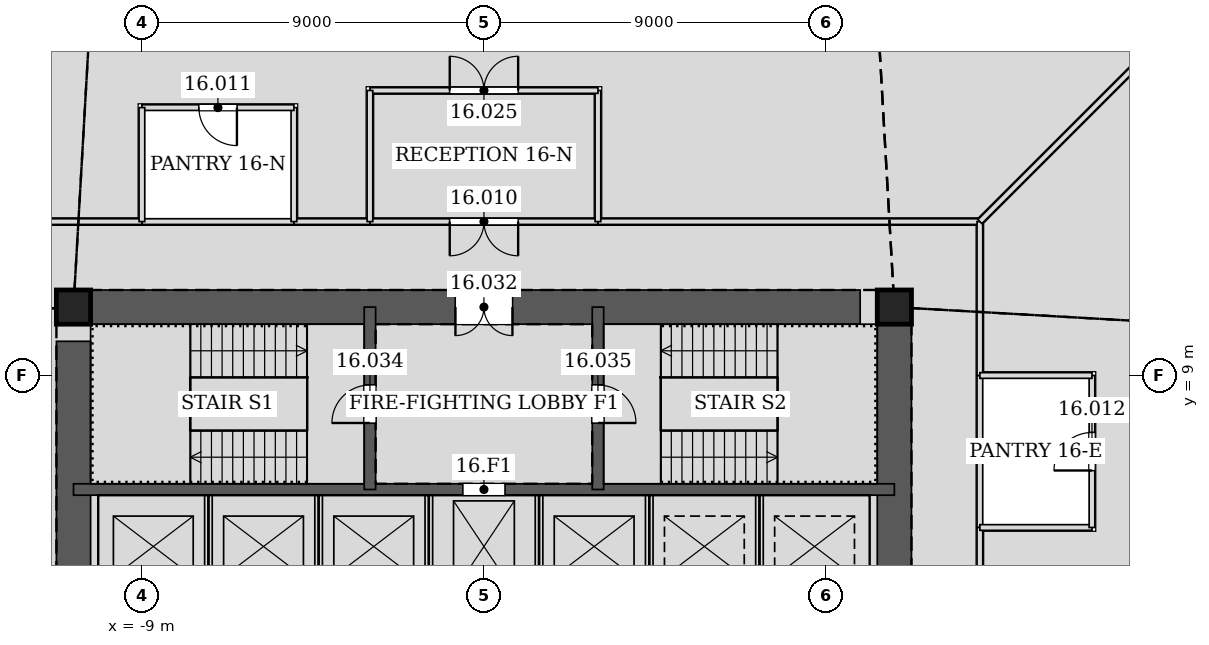
"""IFC4 building model, lengths in metres.
Left out: names, types, materials, properties, quantities, classifications, styles, units other than length and angle.
Written with IfcOpenShell. Run it as: python <this file> out.ifc"""

import sys

from ifc_helpers import new_model, si_unit, direction, frame, frame_2d, origin, origin_2d, place, context, subcontext, project, spatial, rectangle, hollow_rectangle, extrude, element, fill, save


model = new_model("IFC4")
c1 = context("Model", 3, precision=1e-05, world=origin(), true_north=direction((0.0, 1.0)))
c2 = subcontext(c1, "Body", "Model", "MODEL_VIEW")
j1 = project(units=[si_unit("LENGTHUNIT", "METRE"), si_unit("PLANEANGLEUNIT", "RADIAN")], contexts=[c1])
p1 = place(None, origin())
s1 = spatial("IfcSite", under=j1, at=p1, CompositionType="ELEMENT")
p2 = place(p1, origin())
s2 = spatial("IfcBuilding", under=s1, at=p2, CompositionType="ELEMENT")
p3 = place(p2, frame((0.0, 0.0, 75.0)))
s3 = spatial("IfcBuildingStorey", under=s2, at=p3, CompositionType="ELEMENT", Elevation=75.0)
for number, where, z_axis, x_axis in (
    (1, (10.8, 10.8, 0.0), (0.0, 0.0, 1.0), (1.0, 0.0, 0.0)),
    (2, (-10.8, 10.8, 0.0), (0.0, 0.0, 1.0), (1.0, 0.0, 0.0)),
):
    element("IfcColumn", number, at=place(p3, frame(where, z_axis=z_axis, x_axis=x_axis)), inside=s3, PredefinedType="COLUMN", context=c2, shape_type="SweptSolid", body=[
        extrude(hollow_rectangle(XDim=0.9, YDim=0.9, WallThickness=0.06, at=origin_2d()), origin(), (0.0, 0.0, 1.0), 4.2),
    ])
p4 = place(p3, frame((10.8, -10.8, 0.0), z_axis=(0.0, 0.0, 1.0), x_axis=(0.0, 1.0, 0.0)))
e3 = element("IfcWall", 3, at=p4, inside=s3, PredefinedType="SOLIDWALL", context=c2, shape_type="SweptSolid", body=[
    extrude(rectangle(XDim=21.6, YDim=0.9, at=frame_2d((10.8, 0.0))), origin(), (0.0, 0.0, 1.0), 4.2),
])
p5 = place(p4, frame((11.7, 0.0, 0.0)))
e4 = element("IfcOpeningElement", 4, at=p5, cuts=e3, PredefinedType="OPENING", context=c2, shape_type="SweptSolid", body=[
    extrude(rectangle(XDim=1.2, YDim=2.1, at=frame_2d((0.6, 1.05))), frame((0.0, 0.46, 0.0), z_axis=(0.0, -1.0, 0.0), x_axis=(1.0, 0.0, 0.0)), (0.0, 0.0, 1.0), 0.92),
])
p6 = place(p4, frame((8.7, 0.0, 0.0)))
e5 = element("IfcOpeningElement", 5, at=p6, cuts=e3, PredefinedType="OPENING", context=c2, shape_type="SweptSolid", body=[
    extrude(rectangle(XDim=1.2, YDim=2.1, at=frame_2d((0.6, 1.05))), frame((0.0, 0.46, 0.0), z_axis=(0.0, -1.0, 0.0), x_axis=(1.0, 0.0, 0.0)), (0.0, 0.0, 1.0), 0.92),
])
p7 = place(p3, frame((10.8, 10.8, 0.0), z_axis=(0.0, 0.0, 1.0), x_axis=(-1.0, 0.0, 0.0)))
e6 = element("IfcWall", 6, at=p7, inside=s3, PredefinedType="SOLIDWALL", context=c2, shape_type="SweptSolid", body=[
    extrude(rectangle(XDim=21.6, YDim=0.9, at=frame_2d((10.8, 0.0))), origin(), (0.0, 0.0, 1.0), 4.2),
])
p8 = place(p7, frame((10.05, 0.0, 0.0)))
e7 = element("IfcOpeningElement", 7, at=p8, cuts=e6, PredefinedType="OPENING", context=c2, shape_type="SweptSolid", body=[
    extrude(rectangle(XDim=1.5, YDim=2.1, at=frame_2d((0.75, 1.05))), frame((0.0, 0.46, 0.0), z_axis=(0.0, -1.0, 0.0), x_axis=(1.0, 0.0, 0.0)), (0.0, 0.0, 1.0), 0.92),
])
p9 = place(p3, frame((-10.8, 10.8, 0.0), z_axis=(0.0, 0.0, 1.0), x_axis=(0.0, -1.0, 0.0)))
e8 = element("IfcWall", 8, at=p9, inside=s3, PredefinedType="SOLIDWALL", context=c2, shape_type="SweptSolid", body=[
    extrude(rectangle(XDim=21.6, YDim=0.9, at=frame_2d((10.8, 0.0))), origin(), (0.0, 0.0, 1.0), 4.2),
])
p10 = place(p9, frame((8.7, 0.0, 0.0)))
e9 = element("IfcOpeningElement", 9, at=p10, cuts=e8, PredefinedType="OPENING", context=c2, shape_type="SweptSolid", body=[
    extrude(rectangle(XDim=1.2, YDim=2.1, at=frame_2d((0.6, 1.05))), frame((0.0, 0.46, 0.0), z_axis=(0.0, -1.0, 0.0), x_axis=(1.0, 0.0, 0.0)), (0.0, 0.0, 1.0), 0.92),
])
p11 = place(p9, frame((11.7, 0.0, 0.0)))
e10 = element("IfcOpeningElement", 10, at=p11, cuts=e8, PredefinedType="OPENING", context=c2, shape_type="SweptSolid", body=[
    extrude(rectangle(XDim=1.2, YDim=2.1, at=frame_2d((0.6, 1.05))), frame((0.0, 0.46, 0.0), z_axis=(0.0, -1.0, 0.0), x_axis=(1.0, 0.0, 0.0)), (0.0, 0.0, 1.0), 0.92),
])
p12 = place(p3, frame((-10.8, 6.0, 0.0), z_axis=(0.0, 0.0, 1.0), x_axis=(1.0, 0.0, 0.0)))
e11 = element("IfcWall", 11, at=p12, inside=s3, PredefinedType="SOLIDWALL", context=c2, shape_type="SweptSolid", body=[
    extrude(rectangle(XDim=21.6, YDim=0.3, at=frame_2d((10.8, 0.0))), origin(), (0.0, 0.0, 1.0), 4.2),
])
p13 = place(p12, frame((10.25, 0.0, 0.0)))
e12 = element("IfcOpeningElement", 12, at=p13, cuts=e11, PredefinedType="OPENING", context=c2, shape_type="SweptSolid", body=[
    extrude(rectangle(XDim=1.1, YDim=2.1, at=frame_2d((0.55, 1.05))), frame((0.0, 0.16, 0.0), z_axis=(0.0, -1.0, 0.0), x_axis=(1.0, 0.0, 0.0)), (0.0, 0.0, 1.0), 0.32),
])
p14 = place(p3, frame((-3.0, 6.0, 0.0), z_axis=(0.0, 0.0, 1.0), x_axis=(0.0, 1.0, 0.0)))
e13 = element("IfcWall", 13, at=p14, inside=s3, PredefinedType="SOLIDWALL", context=c2, shape_type="SweptSolid", body=[
    extrude(rectangle(XDim=4.8, YDim=0.3, at=frame_2d((2.4, 0.0))), origin(), (0.0, 0.0, 1.0), 4.2),
])
p15 = place(p14, frame((1.75, 0.0, 0.0)))
e14 = element("IfcOpeningElement", 14, at=p15, cuts=e13, PredefinedType="OPENING", context=c2, shape_type="SweptSolid", body=[
    extrude(rectangle(XDim=1.0, YDim=2.1, at=frame_2d((0.5, 1.05))), frame((0.0, 0.16, 0.0), z_axis=(0.0, -1.0, 0.0), x_axis=(1.0, 0.0, 0.0)), (0.0, 0.0, 1.0), 0.32),
])
p16 = place(p3, frame((3.0, 6.0, 0.0), z_axis=(0.0, 0.0, 1.0), x_axis=(0.0, 1.0, 0.0)))
e15 = element("IfcWall", 15, at=p16, inside=s3, PredefinedType="SOLIDWALL", context=c2, shape_type="SweptSolid", body=[
    extrude(rectangle(XDim=4.8, YDim=0.3, at=frame_2d((2.4, 0.0))), origin(), (0.0, 0.0, 1.0), 4.2),
])
p17 = place(p16, frame((1.75, 0.0, 0.0)))
e16 = element("IfcOpeningElement", 16, at=p17, cuts=e15, PredefinedType="OPENING", context=c2, shape_type="SweptSolid", body=[
    extrude(rectangle(XDim=1.0, YDim=2.1, at=frame_2d((0.5, 1.05))), frame((0.0, 0.16, 0.0), z_axis=(0.0, -1.0, 0.0), x_axis=(1.0, 0.0, 0.0)), (0.0, 0.0, 1.0), 0.32),
])
p18 = place(p3, frame((3.001, 13.05, 0.0), z_axis=(0.0, 0.0, 1.0), x_axis=(-1.0, 0.0, 0.0)))
e17 = element("IfcWall", 17, at=p18, inside=s3, PredefinedType="PARTITIONING", context=c2, shape_type="SweptSolid", body=[
    extrude(rectangle(XDim=6.002, YDim=0.15, at=frame_2d((3.001, 0.0))), origin(), (0.0, 0.0, 1.0), 3.065),
])
p19 = place(p18, frame((2.101, 0.0, 0.0)))
e18 = element("IfcOpeningElement", 18, at=p19, cuts=e17, PredefinedType="OPENING", context=c2, shape_type="SweptSolid", body=[
    extrude(rectangle(XDim=1.8, YDim=2.4, at=frame_2d((0.9, 1.2))), frame((0.0, 0.085, 0.0), z_axis=(0.0, -1.0, 0.0), x_axis=(1.0, 0.0, 0.0)), (0.0, 0.0, 1.0), 0.17),
])
for number, where, z_axis, x_axis in (
    (19, (-4.999, 13.05, 0.0), (0.0, 0.0, 1.0), (-1.0, 0.0, 0.0)),
    (20, (13.05, 4.999, 0.0), (0.0, 0.0, 1.0), (0.0, 1.0, 0.0)),
):
    element("IfcWall", number, at=place(p3, frame(where, z_axis=z_axis, x_axis=x_axis)), inside=s3, PredefinedType="PARTITIONING", context=c2, shape_type="SweptSolid", body=[
        extrude(rectangle(XDim=4.002, YDim=0.15, at=frame_2d((2.001, 0.0))), origin(), (0.0, 0.0, 1.0), 4.035),
    ])
p20 = place(p3, frame((-8.999, 13.05, 0.0), z_axis=(0.0, 0.0, 1.0), x_axis=(-1.0, 0.0, 0.0)))
e21 = element("IfcWall", 21, at=p20, inside=s3, PredefinedType="PARTITIONING", context=c2, shape_type="SweptSolid", body=[
    extrude(rectangle(XDim=4.051, YDim=0.15, at=frame_2d((2.025, 0.0))), origin(), (0.0, 0.0, 1.0), 3.014),
])
p21 = place(p3, frame((-2.999, 13.05, 0.0), z_axis=(0.0, 0.0, 1.0), x_axis=(-1.0, 0.0, 0.0)))
e22 = element("IfcWall", 22, at=p21, inside=s3, PredefinedType="PARTITIONING", context=c2, shape_type="SweptSolid", body=[
    extrude(rectangle(XDim=2.002, YDim=0.15, at=frame_2d((1.001, 0.0))), origin(), (0.0, 0.0, 1.0), 4.035),
])
p22 = place(p3, frame((13.05, 13.05, 0.0), z_axis=(0.0, 0.0, 1.0), x_axis=(-1.0, 0.0, 0.0)))
e23 = element("IfcWall", 23, at=p22, inside=s3, PredefinedType="PARTITIONING", context=c2, shape_type="SweptSolid", body=[
    extrude(rectangle(XDim=10.051, YDim=0.15, at=frame_2d((5.025, 0.0))), origin(), (0.0, 0.0, 1.0), 3.014),
])
p23 = place(p3, frame((13.05, 8.999, 0.0), z_axis=(0.0, 0.0, 1.0), x_axis=(0.0, 1.0, 0.0)))
e24 = element("IfcWall", 24, at=p23, inside=s3, PredefinedType="PARTITIONING", context=c2, shape_type="SweptSolid", body=[
    extrude(rectangle(XDim=4.051, YDim=0.15, at=frame_2d((2.025, 0.0))), origin(), (0.0, 0.0, 1.0), 3.014),
])
p24 = place(p3, frame((13.05, -10.05, 0.0), z_axis=(0.0, 0.0, 1.0), x_axis=(0.0, 1.0, 0.0)))
e25 = element("IfcWall", 25, at=p24, inside=s3, PredefinedType="PARTITIONING", context=c2, shape_type="SweptSolid", body=[
    extrude(rectangle(XDim=15.051, YDim=0.15, at=frame_2d((7.525, 0.0))), origin(), (0.0, 0.0, 1.0), 3.065),
])
p25 = place(p24, frame((6.625, 0.0, 0.0)))
e26 = element("IfcOpeningElement", 26, at=p25, cuts=e25, PredefinedType="OPENING", context=c2, shape_type="SweptSolid", body=[
    extrude(rectangle(XDim=1.8, YDim=2.4, at=frame_2d((0.9, 1.2))), frame((0.0, 0.085, 0.0), z_axis=(0.0, -1.0, 0.0), x_axis=(1.0, 0.0, 0.0)), (0.0, 0.0, 1.0), 0.17),
])
p26 = place(p3, frame((3.0, 13.05, 0.0), z_axis=(0.0, 0.0, 1.0), x_axis=(0.0, 1.0, 0.0)))
e27 = element("IfcWall", 27, at=p26, inside=s3, PredefinedType="PARTITIONING", context=c2, shape_type="SweptSolid", body=[
    extrude(rectangle(XDim=3.45, YDim=0.15, at=frame_2d((1.725, 0.0))), origin(), (0.0, 0.0, 1.0), 3.492),
])
p27 = place(p3, frame((3.0, 16.5, 0.0), z_axis=(0.0, 0.0, 1.0), x_axis=(-1.0, 0.0, 0.0)))
e28 = element("IfcWall", 28, at=p27, inside=s3, PredefinedType="PARTITIONING", context=c2, shape_type="SweptSolid", body=[
    extrude(rectangle(XDim=6.0, YDim=0.15, at=frame_2d((3.0, 0.0))), origin(), (0.0, 0.0, 1.0), 3.065),
])
p28 = place(p27, frame((2.1, 0.0, 0.0)))
e29 = element("IfcOpeningElement", 29, at=p28, cuts=e28, PredefinedType="OPENING", context=c2, shape_type="SweptSolid", body=[
    extrude(rectangle(XDim=1.8, YDim=2.4, at=frame_2d((0.9, 1.2))), frame((0.0, 0.085, 0.0), z_axis=(0.0, -1.0, 0.0), x_axis=(1.0, 0.0, 0.0)), (0.0, 0.0, 1.0), 0.17),
])
p29 = place(p3, frame((-3.0, 16.5, 0.0), z_axis=(0.0, 0.0, 1.0), x_axis=(0.0, -1.0, 0.0)))
e30 = element("IfcWall", 30, at=p29, inside=s3, PredefinedType="PARTITIONING", context=c2, shape_type="SweptSolid", body=[
    extrude(rectangle(XDim=3.45, YDim=0.15, at=frame_2d((1.725, 0.0))), origin(), (0.0, 0.0, 1.0), 3.492),
])
p30 = place(p3, frame((-5.0, 13.05, 0.0), z_axis=(0.0, 0.0, 1.0), x_axis=(0.0, 1.0, 0.0)))
e31 = element("IfcWall", 31, at=p30, inside=s3, PredefinedType="PARTITIONING", context=c2, shape_type="SweptSolid", body=[
    extrude(rectangle(XDim=3.0, YDim=0.15, at=frame_2d((1.5, 0.0))), origin(), (0.0, 0.0, 1.0), 3.492),
])
p31 = place(p3, frame((-5.0, 16.05, 0.0), z_axis=(0.0, 0.0, 1.0), x_axis=(-1.0, 0.0, 0.0)))
e32 = element("IfcWall", 32, at=p31, inside=s3, PredefinedType="PARTITIONING", context=c2, shape_type="SweptSolid", body=[
    extrude(rectangle(XDim=4.0, YDim=0.15, at=frame_2d((2.0, 0.0))), origin(), (0.0, 0.0, 1.0), 4.035),
])
p32 = place(p31, frame((1.5, 0.0, 0.0)))
e33 = element("IfcOpeningElement", 33, at=p32, cuts=e32, PredefinedType="OPENING", context=c2, shape_type="SweptSolid", body=[
    extrude(rectangle(XDim=1.0, YDim=2.1, at=frame_2d((0.5, 1.05))), frame((0.0, 0.085, 0.0), z_axis=(0.0, -1.0, 0.0), x_axis=(1.0, 0.0, 0.0)), (0.0, 0.0, 1.0), 0.17),
])
p33 = place(p3, frame((-9.0, 16.05, 0.0), z_axis=(0.0, 0.0, 1.0), x_axis=(0.0, -1.0, 0.0)))
e34 = element("IfcWall", 34, at=p33, inside=s3, PredefinedType="PARTITIONING", context=c2, shape_type="SweptSolid", body=[
    extrude(rectangle(XDim=3.0, YDim=0.15, at=frame_2d((1.5, 0.0))), origin(), (0.0, 0.0, 1.0), 3.492),
])
p34 = place(p3, frame((13.05, 5.0, 0.0), z_axis=(0.0, 0.0, 1.0), x_axis=(1.0, 0.0, 0.0)))
e35 = element("IfcWall", 35, at=p34, inside=s3, PredefinedType="PARTITIONING", context=c2, shape_type="SweptSolid", body=[
    extrude(rectangle(XDim=2.95, YDim=0.15, at=frame_2d((1.475, 0.0))), origin(), (0.0, 0.0, 1.0), 3.492),
])
p35 = place(p3, frame((16.0, 5.0, 0.0), z_axis=(0.0, 0.0, 1.0), x_axis=(0.0, 1.0, 0.0)))
e36 = element("IfcWall", 36, at=p35, inside=s3, PredefinedType="PARTITIONING", context=c2, shape_type="SweptSolid", body=[
    extrude(rectangle(XDim=4.0, YDim=0.15, at=frame_2d((2.0, 0.0))), origin(), (0.0, 0.0, 1.0), 4.035),
])
p36 = place(p35, frame((1.5, 0.0, 0.0)))
e37 = element("IfcOpeningElement", 37, at=p36, cuts=e36, PredefinedType="OPENING", context=c2, shape_type="SweptSolid", body=[
    extrude(rectangle(XDim=1.0, YDim=2.1, at=frame_2d((0.5, 1.05))), frame((0.0, 0.085, 0.0), z_axis=(0.0, -1.0, 0.0), x_axis=(1.0, 0.0, 0.0)), (0.0, 0.0, 1.0), 0.17),
])
p37 = place(p3, frame((16.0, 9.0, 0.0), z_axis=(0.0, 0.0, 1.0), x_axis=(-1.0, 0.0, 0.0)))
e38 = element("IfcWall", 38, at=p37, inside=s3, PredefinedType="PARTITIONING", context=c2, shape_type="SweptSolid", body=[
    extrude(rectangle(XDim=2.95, YDim=0.15, at=frame_2d((1.475, 0.0))), origin(), (0.0, 0.0, 1.0), 3.492),
])
p38 = place(p3, frame((13.05, 13.05, 0.0), z_axis=(0.0, 0.0, 1.0), x_axis=(0.707106781187, 0.707106781187, 0.0)))
e39 = element("IfcWall", 39, at=p38, inside=s3, PredefinedType="PARTITIONING", context=c2, shape_type="SweptSolid", body=[
    extrude(rectangle(XDim=6.25, YDim=0.15, at=frame_2d((3.125, 0.0))), origin(), (0.0, 0.0, 1.0), 3.113),
])
for number, where, z_axis, x_axis in (
    (40, (-7.25, 3.15, 0.0), (0.0, 0.0, 1.0), (0.0, 1.0, 0.0)),
    (41, (-4.35, 3.15, 0.0), (0.0, 0.0, 1.0), (0.0, 1.0, 0.0)),
    (42, (-1.45, 3.15, 0.0), (0.0, 0.0, 1.0), (0.0, 1.0, 0.0)),
    (43, (1.45, 3.15, 0.0), (0.0, 0.0, 1.0), (0.0, 1.0, 0.0)),
    (44, (4.35, 3.15, 0.0), (0.0, 0.0, 1.0), (0.0, 1.0, 0.0)),
    (45, (7.25, 3.15, 0.0), (0.0, 0.0, 1.0), (0.0, 1.0, 0.0)),
):
    element("IfcWall", number, at=place(p3, frame(where, z_axis=z_axis, x_axis=x_axis)), inside=s3, PredefinedType="PARTITIONING", context=c2, shape_type="SweptSolid", body=[
        extrude(rectangle(XDim=2.7, YDim=0.2, at=frame_2d((1.35, 0.0))), origin(), (0.0, 0.0, 1.0), 4.2),
    ])
p39 = place(p19, origin())
e46 = element("IfcDoor", 46, at=p39, inside=s3, OperationType="DOUBLE_DOOR_SINGLE_SWING", PredefinedType="DOOR", context=c2, shape_type="SweptSolid", body=[
    extrude(rectangle(XDim=1.8, YDim=2.4, at=frame_2d((0.9, 1.2))), frame((0.0, 0.025, 0.0), z_axis=(0.0, -1.0, 0.0), x_axis=(1.0, 0.0, 0.0)), (0.0, 0.0, 1.0), 0.05),
])
fill(e18, e46)
p40 = place(p32, origin())
e47 = element("IfcDoor", 47, at=p40, inside=s3, OperationType="SINGLE_SWING_LEFT", PredefinedType="DOOR", context=c2, shape_type="SweptSolid", body=[
    extrude(rectangle(XDim=1.0, YDim=2.1, at=frame_2d((0.5, 1.05))), frame((0.0, 0.025, 0.0), z_axis=(0.0, -1.0, 0.0), x_axis=(1.0, 0.0, 0.0)), (0.0, 0.0, 1.0), 0.05),
])
fill(e33, e47)
p41 = place(p36, origin())
e48 = element("IfcDoor", 48, at=p41, inside=s3, OperationType="SINGLE_SWING_LEFT", PredefinedType="DOOR", context=c2, shape_type="SweptSolid", body=[
    extrude(rectangle(XDim=1.0, YDim=2.1, at=frame_2d((0.5, 1.05))), frame((0.0, 0.025, 0.0), z_axis=(0.0, -1.0, 0.0), x_axis=(1.0, 0.0, 0.0)), (0.0, 0.0, 1.0), 0.05),
])
fill(e37, e48)
p42 = place(p28, frame((1.8, 0.0, 0.0), z_axis=(0.0, 0.0, 1.0), x_axis=(-1.0, 0.0, 0.0)))
e49 = element("IfcDoor", 49, at=p42, inside=s3, OperationType="DOUBLE_DOOR_SINGLE_SWING", PredefinedType="DOOR", context=c2, shape_type="SweptSolid", body=[
    extrude(rectangle(XDim=1.8, YDim=2.4, at=frame_2d((0.9, 1.2))), frame((0.0, 0.025, 0.0), z_axis=(0.0, -1.0, 0.0), x_axis=(1.0, 0.0, 0.0)), (0.0, 0.0, 1.0), 0.05),
])
fill(e29, e49)
p43 = place(p8, origin())
e50 = element("IfcDoor", 50, at=p43, inside=s3, OperationType="DOUBLE_DOOR_SINGLE_SWING", PredefinedType="DOOR", context=c2, shape_type="SweptSolid", body=[
    extrude(rectangle(XDim=1.5, YDim=2.1, at=frame_2d((0.75, 1.05))), frame((0.0, 0.025, 0.0), z_axis=(0.0, -1.0, 0.0), x_axis=(1.0, 0.0, 0.0)), (0.0, 0.0, 1.0), 0.05),
])
fill(e7, e50)
p44 = place(p15, origin())
e51 = element("IfcDoor", 51, at=p44, inside=s3, OperationType="SINGLE_SWING_LEFT", PredefinedType="DOOR", context=c2, shape_type="SweptSolid", body=[
    extrude(rectangle(XDim=1.0, YDim=2.1, at=frame_2d((0.5, 1.05))), frame((0.0, 0.025, 0.0), z_axis=(0.0, -1.0, 0.0), x_axis=(1.0, 0.0, 0.0)), (0.0, 0.0, 1.0), 0.05),
])
fill(e14, e51)
p45 = place(p17, frame((1.0, 0.0, 0.0), z_axis=(0.0, 0.0, 1.0), x_axis=(-1.0, 0.0, 0.0)))
e52 = element("IfcDoor", 52, at=p45, inside=s3, OperationType="SINGLE_SWING_RIGHT", PredefinedType="DOOR", context=c2, shape_type="SweptSolid", body=[
    extrude(rectangle(XDim=1.0, YDim=2.1, at=frame_2d((0.5, 1.05))), frame((0.0, 0.025, 0.0), z_axis=(0.0, -1.0, 0.0), x_axis=(1.0, 0.0, 0.0)), (0.0, 0.0, 1.0), 0.05),
])
fill(e16, e52)
p46 = place(p13, origin())
e53 = element("IfcDoor", 53, at=p46, inside=s3, OperationType="DOUBLE_DOOR_SLIDING", PredefinedType="DOOR", context=c2, shape_type="SweptSolid", body=[
    extrude(rectangle(XDim=1.1, YDim=2.1, at=frame_2d((0.55, 1.05))), frame((0.0, 0.025, 0.0), z_axis=(0.0, -1.0, 0.0), x_axis=(1.0, 0.0, 0.0)), (0.0, 0.0, 1.0), 0.05),
])
fill(e12, e53)
save(model, sys.argv[1])
